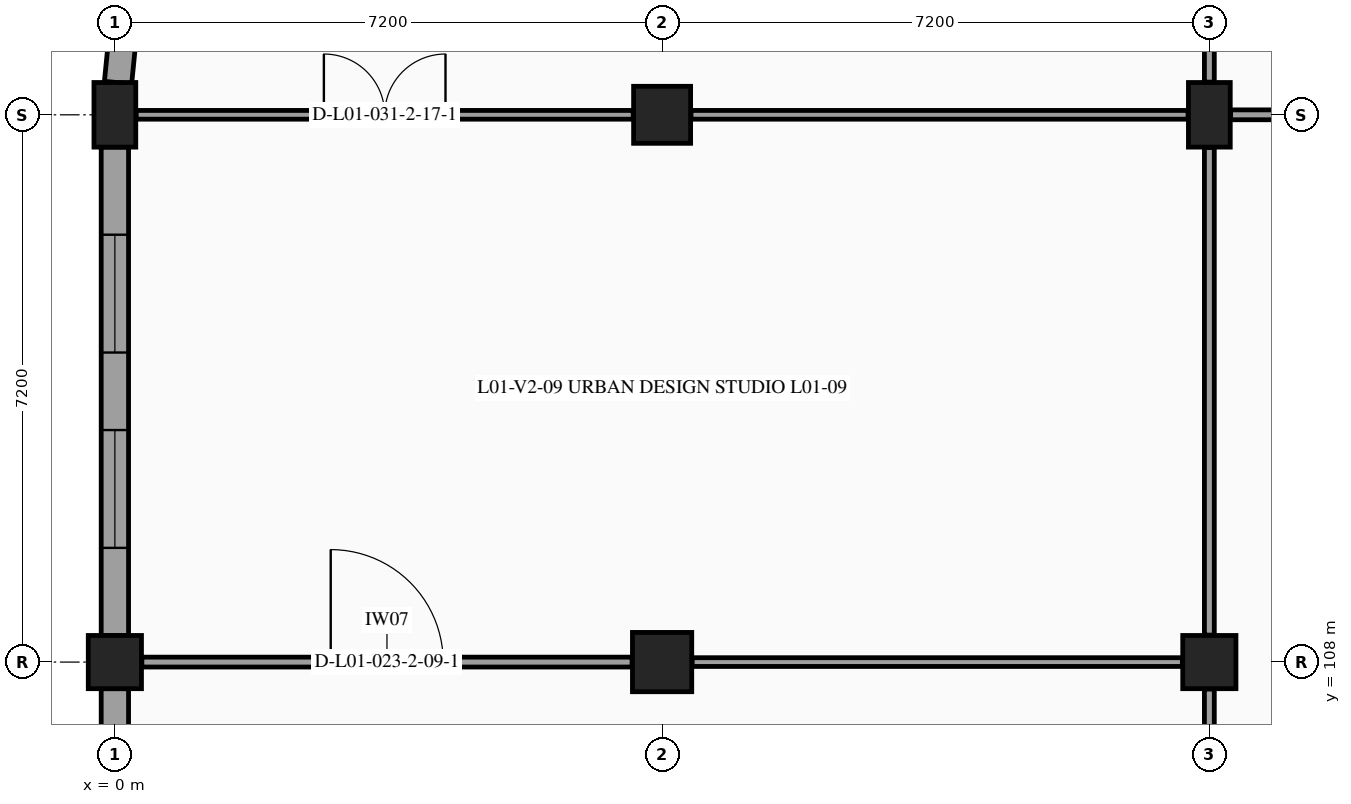
"""IFC4 building model, lengths in metres.
Left out: names, types, materials, properties, quantities, classifications, styles, units other than length and angle.
Written with IfcOpenShell. Run it as: python <this file> out.ifc"""

import sys

from ifc_helpers import new_model, si_unit, direction, frame, frame_2d, origin, origin_2d, place, context, subcontext, project, spatial, rectangle, extrude, element, fill, save


model = new_model("IFC4")
c1 = context("Model", 3, precision=1e-05, world=origin(), true_north=direction((0.0, 1.0)))
c2 = subcontext(c1, "Body", "Model", "MODEL_VIEW")
j1 = project(units=[si_unit("LENGTHUNIT", "METRE"), si_unit("PLANEANGLEUNIT", "RADIAN")], contexts=[c1])
p1 = place(None, origin())
s1 = spatial("IfcSite", under=j1, at=p1, CompositionType="ELEMENT")
p2 = place(p1, origin())
s2 = spatial("IfcBuilding", under=s1, at=p2, CompositionType="ELEMENT")
p3 = place(p2, frame((0.0, 0.0, 5.4)))
s3 = spatial("IfcBuildingStorey", under=s2, at=p3, CompositionType="ELEMENT", Elevation=5.4)
p4 = place(p3, frame((0.0, 108.0, 0.0), z_axis=(0.0, 0.0, 1.0), x_axis=(1.0, 0.0, 0.0)))
e1 = element("IfcColumn", 1, at=p4, inside=s3, PredefinedType="COLUMN", context=c2, shape_type="SweptSolid", body=[
    extrude(rectangle(XDim=0.7, YDim=0.7, at=origin_2d()), origin(), (0.0, 0.0, 1.0), 4.5),
])
p5 = place(p3, frame((0.0, 115.2, 0.0), z_axis=(0.0, 0.0, 1.0), x_axis=(1.0, 0.0, 0.0)))
e2 = element("IfcColumn", 2, at=p5, inside=s3, PredefinedType="COLUMN", context=c2, shape_type="SweptSolid", body=[
    extrude(rectangle(XDim=0.55, YDim=0.85, at=origin_2d()), origin(), (0.0, 0.0, 1.0), 4.5),
])
p6 = place(p3, frame((7.2, 108.0, 0.0), z_axis=(0.0, 0.0, 1.0), x_axis=(1.0, 0.0, 0.0)))
e3 = element("IfcColumn", 3, at=p6, inside=s3, PredefinedType="COLUMN", context=c2, shape_type="SweptSolid", body=[
    extrude(rectangle(XDim=0.78, YDim=0.78, at=origin_2d()), origin(), (0.0, 0.0, 1.0), 4.5),
])
p7 = place(p3, frame((7.2, 115.2, 0.0), z_axis=(0.0, 0.0, 1.0), x_axis=(1.0, 0.0, 0.0)))
e4 = element("IfcColumn", 4, at=p7, inside=s3, PredefinedType="COLUMN", context=c2, shape_type="SweptSolid", body=[
    extrude(rectangle(XDim=0.75, YDim=0.75, at=origin_2d()), origin(), (0.0, 0.0, 1.0), 4.5),
])
p8 = place(p3, frame((14.4, 108.0, 0.0), z_axis=(0.0, 0.0, 1.0), x_axis=(1.0, 0.0, 0.0)))
e5 = element("IfcColumn", 5, at=p8, inside=s3, PredefinedType="COLUMN", context=c2, shape_type="SweptSolid", body=[
    extrude(rectangle(XDim=0.7, YDim=0.7, at=origin_2d()), origin(), (0.0, 0.0, 1.0), 4.5),
])
p9 = place(p3, frame((14.4, 115.2, 0.0), z_axis=(0.0, 0.0, 1.0), x_axis=(1.0, 0.0, 0.0)))
e6 = element("IfcColumn", 6, at=p9, inside=s3, PredefinedType="COLUMN", context=c2, shape_type="SweptSolid", body=[
    extrude(rectangle(XDim=0.55, YDim=0.85, at=origin_2d()), origin(), (0.0, 0.0, 1.0), 4.5),
])
p10 = place(p3, frame((0.0, 101.16, 0.0), z_axis=(0.0, 0.0, 1.0), x_axis=(0.0, 1.0, 0.0)))
e7 = element("IfcWall", 7, at=p10, inside=s3, PredefinedType="STANDARD", context=c2, shape_type="SweptSolid", body=[
    extrude(rectangle(XDim=6.49, YDim=0.36, at=frame_2d((3.245, 0.0))), origin(), (0.0, 0.0, 1.0), 3.455),
])
p11 = place(p10, frame((1.072, 0.0, 1.15)))
e8 = element("IfcOpeningElement", 8, at=p11, cuts=e7, PredefinedType="OPENING", context=c2, shape_type="SweptSolid", body=[
    extrude(rectangle(XDim=1.75, YDim=1.4, at=frame_2d((0.875, 0.7))), frame((0.0, 0.19, 0.0), z_axis=(0.0, -1.0, 0.0), x_axis=(1.0, 0.0, 0.0)), (0.0, 0.0, 1.0), 0.38),
])
p12 = place(p10, frame((3.668, 0.0, 1.15)))
e9 = element("IfcOpeningElement", 9, at=p12, cuts=e7, PredefinedType="OPENING", context=c2, shape_type="SweptSolid", body=[
    extrude(rectangle(XDim=1.75, YDim=1.4, at=frame_2d((0.875, 0.7))), frame((0.0, 0.19, 0.0), z_axis=(0.0, -1.0, 0.0), x_axis=(1.0, 0.0, 0.0)), (0.0, 0.0, 1.0), 0.38),
])
p13 = place(p3, frame((0.0, 108.35, 0.0), z_axis=(0.0, 0.0, 1.0), x_axis=(0.0, 1.0, 0.0)))
e10 = element("IfcWall", 10, at=p13, inside=s3, PredefinedType="STANDARD", context=c2, shape_type="SweptSolid", body=[
    extrude(rectangle(XDim=6.425, YDim=0.36, at=frame_2d((3.212, 0.0))), origin(), (0.0, 0.0, 1.0), 3.455),
])
p14 = place(p13, frame((1.153, 0.0, 1.15)))
e11 = element("IfcOpeningElement", 11, at=p14, cuts=e10, PredefinedType="OPENING", context=c2, shape_type="SweptSolid", body=[
    extrude(rectangle(XDim=1.55, YDim=1.35, at=frame_2d((0.775, 0.675))), frame((0.0, 0.19, 0.0), z_axis=(0.0, -1.0, 0.0), x_axis=(1.0, 0.0, 0.0)), (0.0, 0.0, 1.0), 0.38),
])
p15 = place(p13, frame((3.722, 0.0, 1.15)))
e12 = element("IfcOpeningElement", 12, at=p15, cuts=e10, PredefinedType="OPENING", context=c2, shape_type="SweptSolid", body=[
    extrude(rectangle(XDim=1.55, YDim=1.35, at=frame_2d((0.775, 0.675))), frame((0.0, 0.19, 0.0), z_axis=(0.0, -1.0, 0.0), x_axis=(1.0, 0.0, 0.0)), (0.0, 0.0, 1.0), 0.38),
])
p16 = place(p3, frame((0.042, 115.623, 0.0), z_axis=(0.0, 0.0, 1.0), x_axis=(0.09800882272, 0.99518554585, 0.0)))
e13 = element("IfcWall", 13, at=p16, inside=s3, PredefinedType="STANDARD", context=c2, shape_type="SweptSolid", body=[
    extrude(rectangle(XDim=0.986, YDim=0.36, at=frame_2d((0.493, 0.0))), origin(), (0.0, 0.0, 1.0), 4.21),
])
p17 = place(p3, frame((0.355, 108.0, 0.0), z_axis=(0.0, 0.0, 1.0), x_axis=(1.0, 0.0, 0.0)))
e14 = element("IfcWall", 14, at=p17, inside=s3, PredefinedType="PARTITIONING", context=c2, shape_type="SweptSolid", body=[
    extrude(rectangle(XDim=6.45, YDim=0.13, at=frame_2d((3.225, 0.0))), origin(), (0.0, 0.0, 1.0), 3.46),
])
p18 = place(p17, frame((2.485, 0.0, 0.0)))
e15 = element("IfcOpeningElement", 15, at=p18, cuts=e14, PredefinedType="OPENING", context=c2, shape_type="SweptSolid", body=[
    extrude(rectangle(XDim=1.48, YDim=2.28, at=frame_2d((0.74, 1.14))), frame((0.0, 0.075, 0.0), z_axis=(0.0, -1.0, 0.0), x_axis=(1.0, 0.0, 0.0)), (0.0, 0.0, 1.0), 0.15),
])
p19 = place(p3, frame((0.28, 115.2, 0.0), z_axis=(0.0, 0.0, 1.0), x_axis=(1.0, 0.0, 0.0)))
e16 = element("IfcWall", 16, at=p19, inside=s3, PredefinedType="PARTITIONING", context=c2, shape_type="SweptSolid", body=[
    extrude(rectangle(XDim=6.54, YDim=0.115, at=frame_2d((3.27, 0.0))), origin(), (0.0, 0.0, 1.0), 3.46),
])
p20 = place(p19, frame((2.47, 0.0, 0.0)))
e17 = element("IfcOpeningElement", 17, at=p20, cuts=e16, PredefinedType="OPENING", context=c2, shape_type="SweptSolid", body=[
    extrude(rectangle(XDim=1.6, YDim=2.2, at=frame_2d((0.8, 1.1))), frame((0.0, 0.067, 0.0), z_axis=(0.0, -1.0, 0.0), x_axis=(1.0, 0.0, 0.0)), (0.0, 0.0, 1.0), 0.135),
])
p21 = place(p3, frame((14.4, 101.165, 0.0), z_axis=(0.0, 0.0, 1.0), x_axis=(0.0, 1.0, 0.0)))
e18 = element("IfcWall", 18, at=p21, inside=s3, PredefinedType="PARTITIONING", context=c2, shape_type="SweptSolid", body=[
    extrude(rectangle(XDim=6.48, YDim=0.13, at=frame_2d((3.24, 0.0))), origin(), (0.0, 0.0, 1.0), 3.525),
])
p22 = place(p21, frame((2.765, 0.0, 0.0)))
e19 = element("IfcOpeningElement", 19, at=p22, cuts=e18, PredefinedType="OPENING", context=c2, shape_type="SweptSolid", body=[
    extrude(rectangle(XDim=0.95, YDim=2.15, at=frame_2d((0.475, 1.075))), frame((0.0, 0.075, 0.0), z_axis=(0.0, -1.0, 0.0), x_axis=(1.0, 0.0, 0.0)), (0.0, 0.0, 1.0), 0.15),
])
p23 = place(p3, frame((7.595, 108.0, 0.0), z_axis=(0.0, 0.0, 1.0), x_axis=(1.0, 0.0, 0.0)))
e20 = element("IfcWall", 20, at=p23, inside=s3, PredefinedType="PARTITIONING", context=c2, shape_type="SweptSolid", body=[
    extrude(rectangle(XDim=6.45, YDim=0.115, at=frame_2d((3.225, 0.0))), origin(), (0.0, 0.0, 1.0), 3.47),
])
p24 = place(p3, frame((14.4, 108.355, 0.0), z_axis=(0.0, 0.0, 1.0), x_axis=(0.0, 1.0, 0.0)))
e21 = element("IfcWall", 21, at=p24, inside=s3, PredefinedType="PARTITIONING", context=c2, shape_type="SweptSolid", body=[
    extrude(rectangle(XDim=6.415, YDim=0.13, at=frame_2d((3.208, 0.0))), origin(), (0.0, 0.0, 1.0), 3.525),
])
p25 = place(p3, frame((7.58, 115.2, 0.0), z_axis=(0.0, 0.0, 1.0), x_axis=(1.0, 0.0, 0.0)))
e22 = element("IfcWall", 22, at=p25, inside=s3, PredefinedType="PARTITIONING", context=c2, shape_type="SweptSolid", body=[
    extrude(rectangle(XDim=6.54, YDim=0.115, at=frame_2d((3.27, 0.0))), origin(), (0.0, 0.0, 1.0), 3.47),
])
p26 = place(p3, frame((14.4, 115.63, 0.0), z_axis=(0.0, 0.0, 1.0), x_axis=(0.0, 1.0, 0.0)))
e23 = element("IfcWall", 23, at=p26, inside=s3, PredefinedType="PARTITIONING", context=c2, shape_type="SweptSolid", body=[
    extrude(rectangle(XDim=6.465, YDim=0.13, at=frame_2d((3.232, 0.0))), origin(), (0.0, 0.0, 1.0), 3.52),
])
p27 = place(p26, frame((2.433, 0.0, 0.0)))
e24 = element("IfcOpeningElement", 24, at=p27, cuts=e23, PredefinedType="OPENING", context=c2, shape_type="SweptSolid", body=[
    extrude(rectangle(XDim=1.6, YDim=2.2, at=frame_2d((0.8, 1.1))), frame((0.0, 0.075, 0.0), z_axis=(0.0, -1.0, 0.0), x_axis=(1.0, 0.0, 0.0)), (0.0, 0.0, 1.0), 0.15),
])
p28 = place(p3, frame((14.68, 115.2, 0.0), z_axis=(0.0, 0.0, 1.0), x_axis=(1.0, 0.0, 0.0)))
e25 = element("IfcWall", 25, at=p28, inside=s3, PredefinedType="PARTITIONING", context=c2, shape_type="SweptSolid", body=[
    extrude(rectangle(XDim=6.54, YDim=0.13, at=frame_2d((3.27, 0.0))), origin(), (0.0, 0.0, 1.0), 3.485),
])
p29 = place(p14, origin())
e26 = element("IfcWindow", 26, at=p29, inside=s3, PartitioningType="SINGLE_PANEL", PredefinedType="WINDOW", context=c2, shape_type="SweptSolid", body=[
    extrude(rectangle(XDim=1.55, YDim=1.35, at=frame_2d((0.775, 0.675))), frame((0.0, -0.08, 0.0), z_axis=(0.0, -1.0, 0.0), x_axis=(1.0, 0.0, 0.0)), (0.0, 0.0, 1.0), 0.06),
])
fill(e11, e26)
p30 = place(p15, origin())
e27 = element("IfcWindow", 27, at=p30, inside=s3, PartitioningType="SINGLE_PANEL", PredefinedType="WINDOW", context=c2, shape_type="SweptSolid", body=[
    extrude(rectangle(XDim=1.55, YDim=1.35, at=frame_2d((0.775, 0.675))), frame((0.0, -0.08, 0.0), z_axis=(0.0, -1.0, 0.0), x_axis=(1.0, 0.0, 0.0)), (0.0, 0.0, 1.0), 0.06),
])
fill(e12, e27)
p31 = place(p18, origin())
e28 = element("IfcDoor", 28, at=p31, inside=s3, OperationType="SINGLE_SWING_LEFT", PredefinedType="DOOR", context=c2, shape_type="SweptSolid", body=[
    extrude(rectangle(XDim=1.48, YDim=2.28, at=frame_2d((0.74, 1.14))), frame((0.0, 0.025, 0.0), z_axis=(0.0, -1.0, 0.0), x_axis=(1.0, 0.0, 0.0)), (0.0, 0.0, 1.0), 0.05),
])
fill(e15, e28)
p32 = place(p20, origin())
e29 = element("IfcDoor", 29, at=p32, inside=s3, OperationType="DOUBLE_DOOR_SINGLE_SWING", PredefinedType="DOOR", context=c2, shape_type="SweptSolid", body=[
    extrude(rectangle(XDim=1.6, YDim=2.2, at=frame_2d((0.8, 1.1))), frame((0.0, 0.025, 0.0), z_axis=(0.0, -1.0, 0.0), x_axis=(1.0, 0.0, 0.0)), (0.0, 0.0, 1.0), 0.05),
])
fill(e17, e29)
save(model, sys.argv[1])
